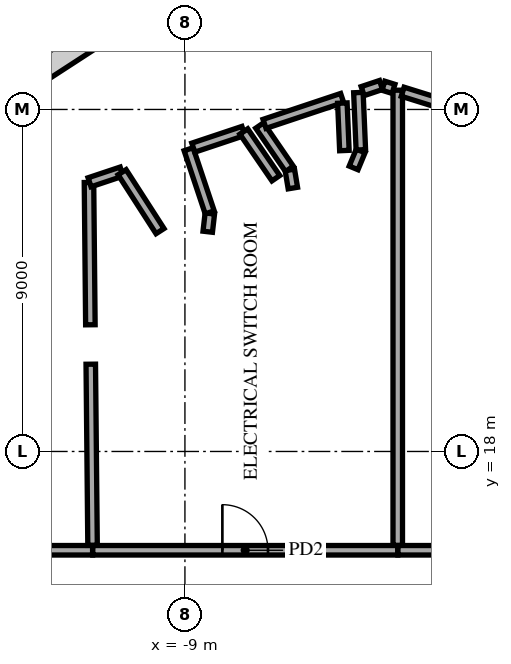
"""IFC4 building model, lengths in metres.
Left out: names, types, materials, properties, quantities, classifications, styles, units other than length and angle.
Written with IfcOpenShell. Run it as: python <this file> out.ifc"""

import sys

from ifc_helpers import new_model, si_unit, direction, frame, frame_2d, origin, place, context, subcontext, project, spatial, rectangle, extrude, element, fill, save


model = new_model("IFC4")
c1 = context("Model", 3, precision=1e-05, world=origin(), true_north=direction((0.0, 1.0)))
c2 = subcontext(c1, "Body", "Model", "MODEL_VIEW")
j1 = project(units=[si_unit("LENGTHUNIT", "METRE"), si_unit("PLANEANGLEUNIT", "RADIAN")], contexts=[c1])
p1 = place(None, origin())
s1 = spatial("IfcSite", under=j1, at=p1, CompositionType="ELEMENT")
p2 = place(p1, origin())
s2 = spatial("IfcBuilding", under=s1, at=p2, CompositionType="ELEMENT")
p3 = place(p2, frame((0.0, 0.0, 344.5)))
s3 = spatial("IfcBuildingStorey", under=s2, at=p3, CompositionType="ELEMENT", Elevation=344.5)
p4 = place(p3, frame((-15.4, 15.4, 0.0), z_axis=(0.0, 0.0, 1.0), x_axis=(1.0, 0.0, 0.0)))
e1 = element("IfcWall", 1, at=p4, inside=s3, PredefinedType="PARTITIONING", context=c2, shape_type="SweptSolid", body=[
    extrude(rectangle(XDim=3.97, YDim=0.25, at=frame_2d((1.985, 0.0))), origin(), (0.0, 0.0, 1.0), 4.466),
])
p5 = place(p3, frame((-11.478, 20.296, 0.0), z_axis=(0.0, 0.0, 1.0), x_axis=(0.009834078559, -0.99995164428, 0.0)))
e2 = element("IfcWall", 2, at=p5, inside=s3, PredefinedType="PARTITIONING", context=c2, shape_type="SweptSolid", body=[
    extrude(rectangle(XDim=4.767, YDim=0.25, at=frame_2d((2.383, 0.0))), origin(), (0.0, 0.0, 1.0), 4.466),
])
p6 = place(p3, frame((-11.425, 15.4, 0.0), z_axis=(0.0, 0.0, 1.0), x_axis=(1.0, 0.0, 0.0)))
e3 = element("IfcWall", 3, at=p6, inside=s3, PredefinedType="PARTITIONING", context=c2, shape_type="SweptSolid", body=[
    extrude(rectangle(XDim=8.025, YDim=0.25, at=frame_2d((4.012, 0.0))), origin(), (0.0, 0.0, 1.0), 5.3),
])
p7 = place(p6, frame((3.41, 0.0, 0.0)))
e4 = element("IfcOpeningElement", 4, at=p7, cuts=e3, PredefinedType="OPENING", context=c2, shape_type="SweptSolid", body=[
    extrude(rectangle(XDim=1.2, YDim=2.1, at=frame_2d((0.6, 1.05))), frame((0.0, 0.135, 0.0), z_axis=(0.0, -1.0, 0.0), x_axis=(1.0, 0.0, 0.0)), (0.0, 0.0, 1.0), 0.27),
])
p8 = place(p3, frame((-3.395, 15.4, 0.0), z_axis=(0.0, 0.0, 1.0), x_axis=(1.0, 0.0, 0.0)))
e5 = element("IfcWall", 5, at=p8, inside=s3, PredefinedType="PARTITIONING", context=c2, shape_type="SweptSolid", body=[
    extrude(rectangle(XDim=8.495, YDim=0.25, at=frame_2d((4.248, 0.0))), origin(), (0.0, 0.0, 1.0), 5.3),
])
p9 = place(p8, frame((3.645, 0.0, 0.0)))
e6 = element("IfcOpeningElement", 6, at=p9, cuts=e5, PredefinedType="OPENING", context=c2, shape_type="SweptSolid", body=[
    extrude(rectangle(XDim=1.2, YDim=2.1, at=frame_2d((0.6, 1.05))), frame((0.0, 0.135, 0.0), z_axis=(0.0, -1.0, 0.0), x_axis=(1.0, 0.0, 0.0)), (0.0, 0.0, 1.0), 0.27),
])
p10 = place(p3, frame((-11.525, 25.079, 0.0), z_axis=(0.0, 0.0, 1.0), x_axis=(0.009844352785, -0.999951543185, 0.0)))
e7 = element("IfcWall", 7, at=p10, inside=s3, PredefinedType="PARTITIONING", context=c2, shape_type="SweptSolid", body=[
    extrude(rectangle(XDim=3.745, YDim=0.25, at=frame_2d((1.873, 0.0))), origin(), (0.0, 0.0, 1.0), 5.3),
])
p11 = place(p3, frame((-8.4, 23.782, 0.0), z_axis=(0.0, 0.0, 1.0), x_axis=(0.113532360215, 0.993534298947, 0.0)))
e8 = element("IfcWall", 8, at=p11, inside=s3, PredefinedType="PARTITIONING", context=c2, shape_type="SweptSolid", body=[
    extrude(rectangle(XDim=0.484, YDim=0.25, at=frame_2d((0.242, 0.0))), origin(), (0.0, 0.0, 1.0), 5.3),
])
p12 = place(p3, frame((-8.903, 25.954, 0.0), z_axis=(0.0, 0.0, 1.0), x_axis=(0.316603987082, -0.94855780813, 0.0)))
e9 = element("IfcWall", 9, at=p12, inside=s3, PredefinedType="PARTITIONING", context=c2, shape_type="SweptSolid", body=[
    extrude(rectangle(XDim=1.752, YDim=0.25, at=frame_2d((0.876, 0.0))), origin(), (0.0, 0.0, 1.0), 5.3),
])
p13 = place(p3, frame((-6.24, 25.409, 0.0), z_axis=(0.0, 0.0, 1.0), x_axis=(0.164562701873, -0.986366624107, 0.0)))
e10 = element("IfcWall", 10, at=p13, inside=s3, PredefinedType="PARTITIONING", context=c2, shape_type="SweptSolid", body=[
    extrude(rectangle(XDim=0.484, YDim=0.25, at=frame_2d((0.242, 0.0))), origin(), (0.0, 0.0, 1.0), 5.3),
])
p14 = place(p3, frame((-11.509, 25.084, 0.0), z_axis=(0.0, 0.0, 1.0), x_axis=(0.948573611036, 0.316556637026, 0.0)))
e11 = element("IfcWall", 11, at=p14, inside=s3, PredefinedType="PARTITIONING", context=c2, shape_type="SweptSolid", body=[
    extrude(rectangle(XDim=0.891, YDim=0.25, at=frame_2d((0.445, 0.0))), origin(), (0.0, 0.0, 1.0), 5.3),
])
p15 = place(p3, frame((-10.653, 25.349, 0.0), z_axis=(0.0, 0.0, 1.0), x_axis=(0.541212626445, -0.840885778793, 0.0)))
e12 = element("IfcWall", 12, at=p15, inside=s3, PredefinedType="PARTITIONING", context=c2, shape_type="SweptSolid", body=[
    extrude(rectangle(XDim=1.844, YDim=0.25, at=frame_2d((0.922, 0.0))), origin(), (0.0, 0.0, 1.0), 5.3),
])
p16 = place(p3, frame((-7.034, 26.578, 0.0), z_axis=(0.0, 0.0, 1.0), x_axis=(0.565960001462, -0.824432699949, 0.0)))
e13 = element("IfcWall", 13, at=p16, inside=s3, PredefinedType="PARTITIONING", context=c2, shape_type="SweptSolid", body=[
    extrude(rectangle(XDim=1.385, YDim=0.25, at=frame_2d((0.692, 0.0))), origin(), (0.0, 0.0, 1.0), 5.3),
])
p17 = place(p3, frame((-4.562, 25.462, 0.0), z_axis=(0.0, 0.0, 1.0), x_axis=(0.383109566303, 0.923702906896, 0.0)))
e14 = element("IfcWall", 14, at=p17, inside=s3, PredefinedType="PARTITIONING", context=c2, shape_type="SweptSolid", body=[
    extrude(rectangle(XDim=0.484, YDim=0.25, at=frame_2d((0.242, 0.0))), origin(), (0.0, 0.0, 1.0), 5.3),
])
p18 = place(p3, frame((-4.436, 27.445, 0.0), z_axis=(0.0, 0.0, 1.0), x_axis=(0.042714017446, -0.999087339883, 0.0)))
e15 = element("IfcWall", 15, at=p18, inside=s3, PredefinedType="PARTITIONING", context=c2, shape_type="SweptSolid", body=[
    extrude(rectangle(XDim=1.509, YDim=0.25, at=frame_2d((0.754, 0.0))), origin(), (0.0, 0.0, 1.0), 5.3),
])
p19 = place(p3, frame((-8.779, 25.995, 0.0), z_axis=(0.0, 0.0, 1.0), x_axis=(0.948542627413, 0.316649465468, 0.0)))
e16 = element("IfcWall", 16, at=p19, inside=s3, PredefinedType="PARTITIONING", context=c2, shape_type="SweptSolid", body=[
    extrude(rectangle(XDim=1.389, YDim=0.25, at=frame_2d((0.695, 0.0))), origin(), (0.0, 0.0, 1.0), 5.3),
])
p20 = place(p3, frame((-7.451, 26.42, 0.0), z_axis=(0.0, 0.0, 1.0), x_axis=(0.565910159473, -0.824466913469, 0.0)))
e17 = element("IfcWall", 17, at=p20, inside=s3, PredefinedType="PARTITIONING", context=c2, shape_type="SweptSolid", body=[
    extrude(rectangle(XDim=1.491, YDim=0.25, at=frame_2d((0.746, 0.0))), origin(), (0.0, 0.0, 1.0), 5.3),
])
p21 = place(p3, frame((-6.906, 26.621, 0.0), z_axis=(0.0, 0.0, 1.0), x_axis=(0.948547169077, 0.316635860312, 0.0)))
e18 = element("IfcWall", 18, at=p21, inside=s3, PredefinedType="PARTITIONING", context=c2, shape_type="SweptSolid", body=[
    extrude(rectangle(XDim=2.154, YDim=0.25, at=frame_2d((1.077, 0.0))), origin(), (0.0, 0.0, 1.0), 5.3),
])
p22 = place(p3, frame((-4.857, 27.167, 0.0), z_axis=(0.0, 0.0, 1.0), x_axis=(0.042792761486, -0.999083970227, 0.0)))
e19 = element("IfcWall", 19, at=p22, inside=s3, PredefinedType="PARTITIONING", context=c2, shape_type="SweptSolid", body=[
    extrude(rectangle(XDim=1.25, YDim=0.25, at=frame_2d((0.625, 0.0))), origin(), (0.0, 0.0, 1.0), 5.3),
])
p23 = place(p3, frame((-4.324, 27.482, 0.0), z_axis=(0.0, 0.0, 1.0), x_axis=(0.948587485996, 0.316515057165, 0.0)))
e20 = element("IfcWall", 20, at=p23, inside=s3, PredefinedType="PARTITIONING", context=c2, shape_type="SweptSolid", body=[
    extrude(rectangle(XDim=0.51, YDim=0.25, at=frame_2d((0.255, 0.0))), origin(), (0.0, 0.0, 1.0), 5.3),
])
p24 = place(p3, frame((-3.4, 15.53, 0.0), z_axis=(0.0, 0.0, 1.0), x_axis=(0.0, 1.0, 0.0)))
e21 = element("IfcWall", 21, at=p24, inside=s3, PredefinedType="PARTITIONING", context=c2, shape_type="SweptSolid", body=[
    extrude(rectangle(XDim=11.977, YDim=0.25, at=frame_2d((5.988, 0.0))), origin(), (0.0, 0.0, 1.0), 4.466),
])
p25 = place(p3, frame((-3.27, 27.466, 0.0), z_axis=(0.0, 0.0, 1.0), x_axis=(0.954726318506, -0.297485557215, 0.0)))
e22 = element("IfcWall", 22, at=p25, inside=s3, PredefinedType="PARTITIONING", context=c2, shape_type="SweptSolid", body=[
    extrude(rectangle(XDim=3.258, YDim=0.25, at=frame_2d((1.629, 0.0))), origin(), (0.0, 0.0, 1.0), 5.3),
])
p26 = place(p3, frame((-3.777, 27.624, 0.0), z_axis=(0.0, 0.0, 1.0), x_axis=(0.954651717909, -0.297724868787, 0.0)))
e23 = element("IfcWall", 23, at=p26, inside=s3, PredefinedType="PARTITIONING", context=c2, shape_type="SweptSolid", body=[
    extrude(rectangle(XDim=0.278, YDim=0.25, at=frame_2d((0.139, 0.0))), origin(), (0.0, 0.0, 1.0), 5.3),
])
p27 = place(p3, frame((26.706, 24.687, 0.0), z_axis=(0.0, 0.0, 1.0), x_axis=(-0.978148014065, 0.207909746237, 0.0)))
e24 = element("IfcWall", 24, at=p27, inside=s3, PredefinedType="STANDARD", context=c2, shape_type="SweptSolid", body=[
    extrude(rectangle(XDim=42.49, YDim=0.6, at=frame_2d((21.245, 0.0))), origin(), (0.0, 0.0, 1.0), 5.3),
])
p28 = place(p27, frame((1.21, 0.0, 0.6)))
e25 = element("IfcOpeningElement", 25, at=p28, cuts=e24, PredefinedType="OPENING", context=c2, shape_type="SweptSolid", body=[
    extrude(rectangle(XDim=2.3, YDim=4.25, at=frame_2d((1.15, 2.125))), frame((0.0, 0.31, 0.0), z_axis=(0.0, -1.0, 0.0), x_axis=(1.0, 0.0, 0.0)), (0.0, 0.0, 1.0), 0.62),
])
p29 = place(p27, frame((5.932, 0.0, 0.6)))
e26 = element("IfcOpeningElement", 26, at=p29, cuts=e24, PredefinedType="OPENING", context=c2, shape_type="SweptSolid", body=[
    extrude(rectangle(XDim=2.3, YDim=4.25, at=frame_2d((1.15, 2.125))), frame((0.0, 0.31, 0.0), z_axis=(0.0, -1.0, 0.0), x_axis=(1.0, 0.0, 0.0)), (0.0, 0.0, 1.0), 0.62),
])
p30 = place(p27, frame((10.653, 0.0, 0.6)))
e27 = element("IfcOpeningElement", 27, at=p30, cuts=e24, PredefinedType="OPENING", context=c2, shape_type="SweptSolid", body=[
    extrude(rectangle(XDim=2.3, YDim=4.25, at=frame_2d((1.15, 2.125))), frame((0.0, 0.31, 0.0), z_axis=(0.0, -1.0, 0.0), x_axis=(1.0, 0.0, 0.0)), (0.0, 0.0, 1.0), 0.62),
])
p31 = place(p27, frame((15.374, 0.0, 0.6)))
e28 = element("IfcOpeningElement", 28, at=p31, cuts=e24, PredefinedType="OPENING", context=c2, shape_type="SweptSolid", body=[
    extrude(rectangle(XDim=2.3, YDim=4.25, at=frame_2d((1.15, 2.125))), frame((0.0, 0.31, 0.0), z_axis=(0.0, -1.0, 0.0), x_axis=(1.0, 0.0, 0.0)), (0.0, 0.0, 1.0), 0.62),
])
p32 = place(p27, frame((20.095, 0.0, 0.6)))
e29 = element("IfcOpeningElement", 29, at=p32, cuts=e24, PredefinedType="OPENING", context=c2, shape_type="SweptSolid", body=[
    extrude(rectangle(XDim=2.3, YDim=4.25, at=frame_2d((1.15, 2.125))), frame((0.0, 0.31, 0.0), z_axis=(0.0, -1.0, 0.0), x_axis=(1.0, 0.0, 0.0)), (0.0, 0.0, 1.0), 0.62),
])
p33 = place(p27, frame((24.816, 0.0, 0.6)))
e30 = element("IfcOpeningElement", 30, at=p33, cuts=e24, PredefinedType="OPENING", context=c2, shape_type="SweptSolid", body=[
    extrude(rectangle(XDim=2.3, YDim=4.25, at=frame_2d((1.15, 2.125))), frame((0.0, 0.31, 0.0), z_axis=(0.0, -1.0, 0.0), x_axis=(1.0, 0.0, 0.0)), (0.0, 0.0, 1.0), 0.62),
])
p34 = place(p27, frame((29.537, 0.0, 0.6)))
e31 = element("IfcOpeningElement", 31, at=p34, cuts=e24, PredefinedType="OPENING", context=c2, shape_type="SweptSolid", body=[
    extrude(rectangle(XDim=2.3, YDim=4.25, at=frame_2d((1.15, 2.125))), frame((0.0, 0.31, 0.0), z_axis=(0.0, -1.0, 0.0), x_axis=(1.0, 0.0, 0.0)), (0.0, 0.0, 1.0), 0.62),
])
p35 = place(p27, frame((34.258, 0.0, 0.6)))
e32 = element("IfcOpeningElement", 32, at=p35, cuts=e24, PredefinedType="OPENING", context=c2, shape_type="SweptSolid", body=[
    extrude(rectangle(XDim=2.3, YDim=4.25, at=frame_2d((1.15, 2.125))), frame((0.0, 0.31, 0.0), z_axis=(0.0, -1.0, 0.0), x_axis=(1.0, 0.0, 0.0)), (0.0, 0.0, 1.0), 0.62),
])
p36 = place(p27, frame((38.979, 0.0, 0.6)))
e33 = element("IfcOpeningElement", 33, at=p36, cuts=e24, PredefinedType="OPENING", context=c2, shape_type="SweptSolid", body=[
    extrude(rectangle(XDim=2.3, YDim=4.25, at=frame_2d((1.15, 2.125))), frame((0.0, 0.31, 0.0), z_axis=(0.0, -1.0, 0.0), x_axis=(1.0, 0.0, 0.0)), (0.0, 0.0, 1.0), 0.62),
])
p37 = place(p3, frame((-11.554, 28.827, 0.0), z_axis=(0.0, 0.0, 1.0), x_axis=(-0.838674939243, -0.544632303747, 0.0)))
e34 = element("IfcWall", 34, at=p37, inside=s3, PredefinedType="STANDARD", context=c2, shape_type="SweptSolid", body=[
    extrude(rectangle(XDim=2.989, YDim=0.6, at=frame_2d((1.495, 0.0))), origin(), (0.0, 0.0, 1.0), 5.3),
])
p38 = place(p7, origin())
e35 = element("IfcDoor", 35, at=p38, inside=s3, OperationType="SINGLE_SWING_RIGHT", PredefinedType="DOOR", context=c2, shape_type="SweptSolid", body=[
    extrude(rectangle(XDim=1.2, YDim=2.1, at=frame_2d((0.6, 1.05))), frame((0.0, 0.025, 0.0), z_axis=(0.0, -1.0, 0.0), x_axis=(1.0, 0.0, 0.0)), (0.0, 0.0, 1.0), 0.05),
])
fill(e4, e35)
save(model, sys.argv[1])
